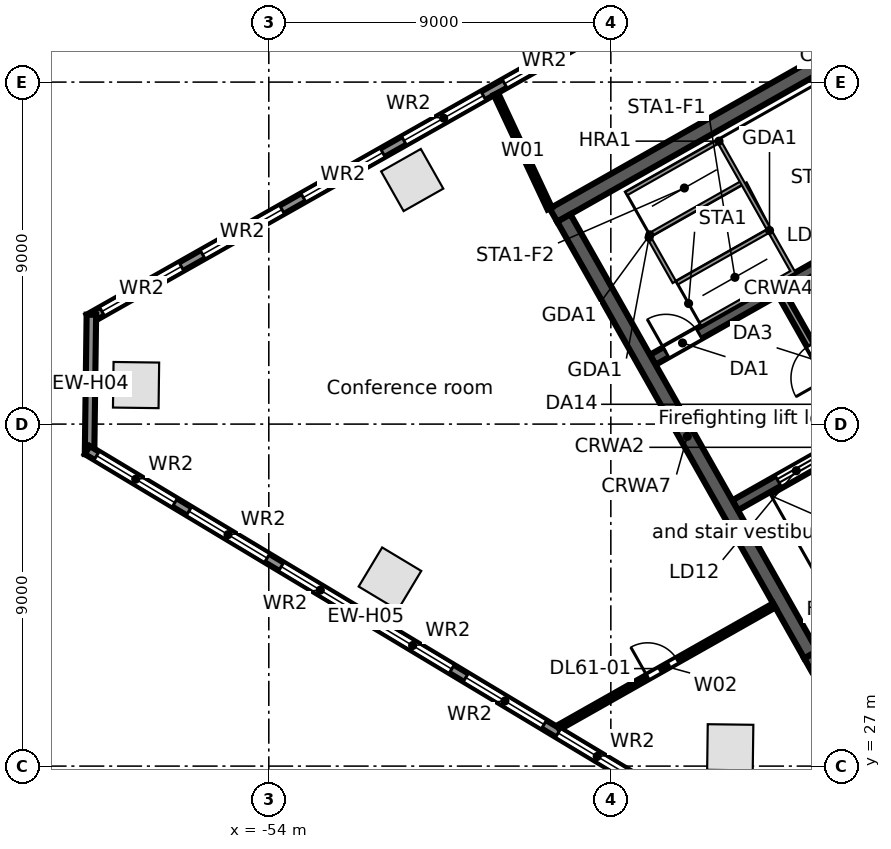
"""IFC4 building model, lengths in metres.
Left out: names, types, materials, properties, quantities, classifications, styles, units other than length and angle.
Written with IfcOpenShell. Run it as: python <this file> out.ifc"""

import sys

from ifc_helpers import new_model, si_unit, direction, frame, frame_2d, origin, origin_2d, place, context, subcontext, project, spatial, rectangle, extrude, element, fill, save


model = new_model("IFC4")
c1 = context("Model", 3, precision=1e-05, world=origin(), true_north=direction((0.0, 1.0)))
c2 = subcontext(c1, "Body", "Model", "MODEL_VIEW")
j1 = project(units=[si_unit("LENGTHUNIT", "METRE"), si_unit("PLANEANGLEUNIT", "RADIAN")], contexts=[c1])
p1 = place(None, origin())
s1 = spatial("IfcSite", under=j1, at=p1, CompositionType="ELEMENT")
p2 = place(p1, origin())
s2 = spatial("IfcBuilding", under=s1, at=p2, CompositionType="ELEMENT")
p3 = place(p2, frame((0.0, 0.0, 274.1)))
s3 = spatial("IfcBuildingStorey", under=s2, at=p3, CompositionType="ELEMENT", Elevation=274.1)
for number, where, z_axis, x_axis in (
    (1, (-50.226, 42.423, 0.0), (0.0, 0.0, 1.0), (-0.87, -0.492, 0.0)),
    (2, (-57.493, 37.027, 0.0), (0.0, 0.0, 1.0), (-0.013, -1.0, 0.0)),
    (3, (-50.812, 31.931, 0.0), (0.0, 0.0, 1.0), (0.857, -0.515, 0.0)),
    (4, (-41.858, 27.495, 0.0), (0.0, 0.0, 1.0), (1.0, -0.013, 0.0)),
):
    element("IfcColumn", number, at=place(p3, frame(where, z_axis=z_axis, x_axis=x_axis)), inside=s3, PredefinedType="COLUMN", context=c2, shape_type="SweptSolid", body=[
        extrude(rectangle(XDim=1.2, YDim=1.2, at=origin_2d()), origin(), (0.0, 0.0, 1.0), 3.8),
    ])
p4 = place(p3, frame((-58.732, 38.771, 0.0), z_axis=(0.0, 0.0, 1.0), x_axis=(0.870355615581, 0.492423702137, 0.0)))
e5 = element("IfcWall", 5, at=p4, inside=s3, PredefinedType="STANDARD", context=c2, shape_type="SweptSolid", body=[
    extrude(rectangle(XDim=64.052, YDim=0.25, at=frame_2d((32.026, 0.0))), origin(), (0.0, 0.0, 1.0), 3.52),
])
p5 = place(p4, frame((61.259, 0.0, 0.8)))
e6 = element("IfcOpeningElement", 6, at=p5, cuts=e5, PredefinedType="OPENING", context=c2, shape_type="SweptSolid", body=[
    extrude(rectangle(XDim=2.4, YDim=2.2, at=frame_2d((1.2, 1.1))), frame((0.0, 0.135, 0.0), z_axis=(0.0, -1.0, 0.0), x_axis=(1.0, 0.0, 0.0)), (0.0, 0.0, 1.0), 0.27),
])
p6 = place(p4, frame((58.216, 0.0, 0.8)))
e7 = element("IfcOpeningElement", 7, at=p6, cuts=e5, PredefinedType="OPENING", context=c2, shape_type="SweptSolid", body=[
    extrude(rectangle(XDim=2.4, YDim=2.2, at=frame_2d((1.2, 1.1))), frame((0.0, 0.135, 0.0), z_axis=(0.0, -1.0, 0.0), x_axis=(1.0, 0.0, 0.0)), (0.0, 0.0, 1.0), 0.27),
])
p7 = place(p4, frame((55.173, 0.0, 0.8)))
e8 = element("IfcOpeningElement", 8, at=p7, cuts=e5, PredefinedType="OPENING", context=c2, shape_type="SweptSolid", body=[
    extrude(rectangle(XDim=2.4, YDim=2.2, at=frame_2d((1.2, 1.1))), frame((0.0, 0.135, 0.0), z_axis=(0.0, -1.0, 0.0), x_axis=(1.0, 0.0, 0.0)), (0.0, 0.0, 1.0), 0.27),
])
p8 = place(p4, frame((52.129, 0.0, 0.8)))
e9 = element("IfcOpeningElement", 9, at=p8, cuts=e5, PredefinedType="OPENING", context=c2, shape_type="SweptSolid", body=[
    extrude(rectangle(XDim=2.4, YDim=2.2, at=frame_2d((1.2, 1.1))), frame((0.0, 0.135, 0.0), z_axis=(0.0, -1.0, 0.0), x_axis=(1.0, 0.0, 0.0)), (0.0, 0.0, 1.0), 0.27),
])
p9 = place(p4, frame((49.086, 0.0, 0.8)))
e10 = element("IfcOpeningElement", 10, at=p9, cuts=e5, PredefinedType="OPENING", context=c2, shape_type="SweptSolid", body=[
    extrude(rectangle(XDim=2.4, YDim=2.2, at=frame_2d((1.2, 1.1))), frame((0.0, 0.135, 0.0), z_axis=(0.0, -1.0, 0.0), x_axis=(1.0, 0.0, 0.0)), (0.0, 0.0, 1.0), 0.27),
])
p10 = place(p4, frame((46.043, 0.0, 0.8)))
e11 = element("IfcOpeningElement", 11, at=p10, cuts=e5, PredefinedType="OPENING", context=c2, shape_type="SweptSolid", body=[
    extrude(rectangle(XDim=2.4, YDim=2.2, at=frame_2d((1.2, 1.1))), frame((0.0, 0.135, 0.0), z_axis=(0.0, -1.0, 0.0), x_axis=(1.0, 0.0, 0.0)), (0.0, 0.0, 1.0), 0.27),
])
p11 = place(p4, frame((43.0, 0.0, 0.8)))
e12 = element("IfcOpeningElement", 12, at=p11, cuts=e5, PredefinedType="OPENING", context=c2, shape_type="SweptSolid", body=[
    extrude(rectangle(XDim=2.4, YDim=2.2, at=frame_2d((1.2, 1.1))), frame((0.0, 0.135, 0.0), z_axis=(0.0, -1.0, 0.0), x_axis=(1.0, 0.0, 0.0)), (0.0, 0.0, 1.0), 0.27),
])
p12 = place(p4, frame((39.956, 0.0, 0.8)))
e13 = element("IfcOpeningElement", 13, at=p12, cuts=e5, PredefinedType="OPENING", context=c2, shape_type="SweptSolid", body=[
    extrude(rectangle(XDim=2.4, YDim=2.2, at=frame_2d((1.2, 1.1))), frame((0.0, 0.135, 0.0), z_axis=(0.0, -1.0, 0.0), x_axis=(1.0, 0.0, 0.0)), (0.0, 0.0, 1.0), 0.27),
])
p13 = place(p4, frame((36.913, 0.0, 0.8)))
e14 = element("IfcOpeningElement", 14, at=p13, cuts=e5, PredefinedType="OPENING", context=c2, shape_type="SweptSolid", body=[
    extrude(rectangle(XDim=2.4, YDim=2.2, at=frame_2d((1.2, 1.1))), frame((0.0, 0.135, 0.0), z_axis=(0.0, -1.0, 0.0), x_axis=(1.0, 0.0, 0.0)), (0.0, 0.0, 1.0), 0.27),
])
p14 = place(p4, frame((33.87, 0.0, 0.8)))
e15 = element("IfcOpeningElement", 15, at=p14, cuts=e5, PredefinedType="OPENING", context=c2, shape_type="SweptSolid", body=[
    extrude(rectangle(XDim=2.4, YDim=2.2, at=frame_2d((1.2, 1.1))), frame((0.0, 0.135, 0.0), z_axis=(0.0, -1.0, 0.0), x_axis=(1.0, 0.0, 0.0)), (0.0, 0.0, 1.0), 0.27),
])
p15 = place(p4, frame((30.826, 0.0, 0.8)))
e16 = element("IfcOpeningElement", 16, at=p15, cuts=e5, PredefinedType="OPENING", context=c2, shape_type="SweptSolid", body=[
    extrude(rectangle(XDim=2.4, YDim=2.2, at=frame_2d((1.2, 1.1))), frame((0.0, 0.135, 0.0), z_axis=(0.0, -1.0, 0.0), x_axis=(1.0, 0.0, 0.0)), (0.0, 0.0, 1.0), 0.27),
])
p16 = place(p4, frame((27.783, 0.0, 0.8)))
e17 = element("IfcOpeningElement", 17, at=p16, cuts=e5, PredefinedType="OPENING", context=c2, shape_type="SweptSolid", body=[
    extrude(rectangle(XDim=2.4, YDim=2.2, at=frame_2d((1.2, 1.1))), frame((0.0, 0.135, 0.0), z_axis=(0.0, -1.0, 0.0), x_axis=(1.0, 0.0, 0.0)), (0.0, 0.0, 1.0), 0.27),
])
p17 = place(p4, frame((24.74, 0.0, 0.8)))
e18 = element("IfcOpeningElement", 18, at=p17, cuts=e5, PredefinedType="OPENING", context=c2, shape_type="SweptSolid", body=[
    extrude(rectangle(XDim=2.4, YDim=2.2, at=frame_2d((1.2, 1.1))), frame((0.0, 0.135, 0.0), z_axis=(0.0, -1.0, 0.0), x_axis=(1.0, 0.0, 0.0)), (0.0, 0.0, 1.0), 0.27),
])
p18 = place(p4, frame((21.696, 0.0, 0.8)))
e19 = element("IfcOpeningElement", 19, at=p18, cuts=e5, PredefinedType="OPENING", context=c2, shape_type="SweptSolid", body=[
    extrude(rectangle(XDim=2.4, YDim=2.2, at=frame_2d((1.2, 1.1))), frame((0.0, 0.135, 0.0), z_axis=(0.0, -1.0, 0.0), x_axis=(1.0, 0.0, 0.0)), (0.0, 0.0, 1.0), 0.27),
])
p19 = place(p4, frame((18.653, 0.0, 0.8)))
e20 = element("IfcOpeningElement", 20, at=p19, cuts=e5, PredefinedType="OPENING", context=c2, shape_type="SweptSolid", body=[
    extrude(rectangle(XDim=2.4, YDim=2.2, at=frame_2d((1.2, 1.1))), frame((0.0, 0.135, 0.0), z_axis=(0.0, -1.0, 0.0), x_axis=(1.0, 0.0, 0.0)), (0.0, 0.0, 1.0), 0.27),
])
p20 = place(p4, frame((15.61, 0.0, 0.8)))
e21 = element("IfcOpeningElement", 21, at=p20, cuts=e5, PredefinedType="OPENING", context=c2, shape_type="SweptSolid", body=[
    extrude(rectangle(XDim=2.4, YDim=2.2, at=frame_2d((1.2, 1.1))), frame((0.0, 0.135, 0.0), z_axis=(0.0, -1.0, 0.0), x_axis=(1.0, 0.0, 0.0)), (0.0, 0.0, 1.0), 0.27),
])
p21 = place(p4, frame((12.567, 0.0, 0.8)))
e22 = element("IfcOpeningElement", 22, at=p21, cuts=e5, PredefinedType="OPENING", context=c2, shape_type="SweptSolid", body=[
    extrude(rectangle(XDim=2.4, YDim=2.2, at=frame_2d((1.2, 1.1))), frame((0.0, 0.135, 0.0), z_axis=(0.0, -1.0, 0.0), x_axis=(1.0, 0.0, 0.0)), (0.0, 0.0, 1.0), 0.27),
])
p22 = place(p4, frame((9.523, 0.0, 0.8)))
e23 = element("IfcOpeningElement", 23, at=p22, cuts=e5, PredefinedType="OPENING", context=c2, shape_type="SweptSolid", body=[
    extrude(rectangle(XDim=2.4, YDim=2.2, at=frame_2d((1.2, 1.1))), frame((0.0, 0.135, 0.0), z_axis=(0.0, -1.0, 0.0), x_axis=(1.0, 0.0, 0.0)), (0.0, 0.0, 1.0), 0.27),
])
p23 = place(p4, frame((6.48, 0.0, 0.8)))
e24 = element("IfcOpeningElement", 24, at=p23, cuts=e5, PredefinedType="OPENING", context=c2, shape_type="SweptSolid", body=[
    extrude(rectangle(XDim=2.4, YDim=2.2, at=frame_2d((1.2, 1.1))), frame((0.0, 0.135, 0.0), z_axis=(0.0, -1.0, 0.0), x_axis=(1.0, 0.0, 0.0)), (0.0, 0.0, 1.0), 0.27),
])
p24 = place(p4, frame((3.437, 0.0, 0.8)))
e25 = element("IfcOpeningElement", 25, at=p24, cuts=e5, PredefinedType="OPENING", context=c2, shape_type="SweptSolid", body=[
    extrude(rectangle(XDim=2.4, YDim=2.2, at=frame_2d((1.2, 1.1))), frame((0.0, 0.135, 0.0), z_axis=(0.0, -1.0, 0.0), x_axis=(1.0, 0.0, 0.0)), (0.0, 0.0, 1.0), 0.27),
])
p25 = place(p4, frame((0.393, 0.0, 0.8)))
e26 = element("IfcOpeningElement", 26, at=p25, cuts=e5, PredefinedType="OPENING", context=c2, shape_type="SweptSolid", body=[
    extrude(rectangle(XDim=2.4, YDim=2.2, at=frame_2d((1.2, 1.1))), frame((0.0, 0.135, 0.0), z_axis=(0.0, -1.0, 0.0), x_axis=(1.0, 0.0, 0.0)), (0.0, 0.0, 1.0), 0.27),
])
p26 = place(p3, frame((-58.717, 35.208, 0.0), z_axis=(0.0, 0.0, 1.0), x_axis=(0.01310512158, 0.999914124207, 0.0)))
e27 = element("IfcWall", 27, at=p26, inside=s3, PredefinedType="STANDARD", context=c2, shape_type="SweptSolid", body=[
    extrude(rectangle(XDim=3.67, YDim=0.25, at=frame_2d((1.835, 0.0))), origin(), (0.0, 0.0, 1.0), 3.52),
])
p27 = place(p3, frame((-44.115, 26.507, 0.0), z_axis=(0.0, 0.0, 1.0), x_axis=(-0.857166583633, 0.515039268311, 0.0)))
e28 = element("IfcWall", 28, at=p27, inside=s3, PredefinedType="STANDARD", context=c2, shape_type="SweptSolid", body=[
    extrude(rectangle(XDim=17.106, YDim=0.25, at=frame_2d((8.553, 0.0))), origin(), (0.0, 0.0, 1.0), 3.52),
])
p28 = place(p27, frame((14.417, 0.0, 0.8)))
e29 = element("IfcOpeningElement", 29, at=p28, cuts=e28, PredefinedType="OPENING", context=c2, shape_type="SweptSolid", body=[
    extrude(rectangle(XDim=2.4, YDim=2.2, at=frame_2d((1.2, 1.1))), frame((0.0, 0.135, 0.0), z_axis=(0.0, -1.0, 0.0), x_axis=(1.0, 0.0, 0.0)), (0.0, 0.0, 1.0), 0.27),
])
p29 = place(p27, frame((11.584, 0.0, 0.8)))
e30 = element("IfcOpeningElement", 30, at=p29, cuts=e28, PredefinedType="OPENING", context=c2, shape_type="SweptSolid", body=[
    extrude(rectangle(XDim=2.4, YDim=2.2, at=frame_2d((1.2, 1.1))), frame((0.0, 0.135, 0.0), z_axis=(0.0, -1.0, 0.0), x_axis=(1.0, 0.0, 0.0)), (0.0, 0.0, 1.0), 0.27),
])
p30 = place(p27, frame((8.75, 0.0, 0.8)))
e31 = element("IfcOpeningElement", 31, at=p30, cuts=e28, PredefinedType="OPENING", context=c2, shape_type="SweptSolid", body=[
    extrude(rectangle(XDim=2.4, YDim=2.2, at=frame_2d((1.2, 1.1))), frame((0.0, 0.135, 0.0), z_axis=(0.0, -1.0, 0.0), x_axis=(1.0, 0.0, 0.0)), (0.0, 0.0, 1.0), 0.27),
])
p31 = place(p27, frame((5.917, 0.0, 0.8)))
e32 = element("IfcOpeningElement", 32, at=p31, cuts=e28, PredefinedType="OPENING", context=c2, shape_type="SweptSolid", body=[
    extrude(rectangle(XDim=2.4, YDim=2.2, at=frame_2d((1.2, 1.1))), frame((0.0, 0.135, 0.0), z_axis=(0.0, -1.0, 0.0), x_axis=(1.0, 0.0, 0.0)), (0.0, 0.0, 1.0), 0.27),
])
p32 = place(p27, frame((3.084, 0.0, 0.8)))
e33 = element("IfcOpeningElement", 33, at=p32, cuts=e28, PredefinedType="OPENING", context=c2, shape_type="SweptSolid", body=[
    extrude(rectangle(XDim=2.4, YDim=2.2, at=frame_2d((1.2, 1.1))), frame((0.0, 0.135, 0.0), z_axis=(0.0, -1.0, 0.0), x_axis=(1.0, 0.0, 0.0)), (0.0, 0.0, 1.0), 0.27),
])
p33 = place(p27, frame((0.25, 0.0, 0.8)))
e34 = element("IfcOpeningElement", 34, at=p33, cuts=e28, PredefinedType="OPENING", context=c2, shape_type="SweptSolid", body=[
    extrude(rectangle(XDim=2.4, YDim=2.2, at=frame_2d((1.2, 1.1))), frame((0.0, 0.135, 0.0), z_axis=(0.0, -1.0, 0.0), x_axis=(1.0, 0.0, 0.0)), (0.0, 0.0, 1.0), 0.27),
])
p34 = place(p3, frame((-39.813, 29.662, 0.0), z_axis=(0.0, 0.0, 1.0), x_axis=(0.870350116061, 0.492433422375, 0.0)))
e35 = element("IfcWall", 35, at=p34, inside=s3, PredefinedType="SOLIDWALL", context=c2, shape_type="SweptSolid", body=[
    extrude(rectangle(XDim=17.0, YDim=0.4, at=frame_2d((8.5, 0.0))), origin(), (0.0, 0.0, 1.0), 3.52),
])
p35 = place(p34, frame((7.2, 0.0, 0.0)))
e36 = element("IfcOpeningElement", 36, at=p35, cuts=e35, PredefinedType="OPENING", context=c2, shape_type="SweptSolid", body=[
    extrude(rectangle(XDim=1.2, YDim=2.1, at=frame_2d((0.6, 1.05))), frame((0.0, 0.21, 0.0), z_axis=(0.0, -1.0, 0.0), x_axis=(1.0, 0.0, 0.0)), (0.0, 0.0, 1.0), 0.42),
])
p36 = place(p3, frame((-41.73, 33.863, 0.0), z_axis=(0.0, 0.0, 1.0), x_axis=(0.870350800578, 0.492432212525, 0.0)))
e37 = element("IfcWall", 37, at=p36, inside=s3, PredefinedType="SOLIDWALL", context=c2, shape_type="SweptSolid", body=[
    extrude(rectangle(XDim=6.2, YDim=0.3, at=frame_2d((3.1, 0.0))), origin(), (0.0, 0.0, 1.0), 3.52),
])
p37 = place(p36, frame((1.3, 0.0, 0.0)))
e38 = element("IfcOpeningElement", 38, at=p37, cuts=e37, PredefinedType="OPENING", context=c2, shape_type="SweptSolid", body=[
    extrude(rectangle(XDim=1.1, YDim=2.1, at=frame_2d((0.55, 1.05))), frame((0.0, 0.16, 0.0), z_axis=(0.0, -1.0, 0.0), x_axis=(1.0, 0.0, 0.0)), (0.0, 0.0, 1.0), 0.32),
])
p38 = place(p36, frame((4.95, 0.0, 0.0)))
e39 = element("IfcOpeningElement", 39, at=p38, cuts=e37, PredefinedType="OPENING", context=c2, shape_type="SweptSolid", body=[
    extrude(rectangle(XDim=0.9, YDim=2.1, at=frame_2d((0.45, 1.05))), frame((0.0, 0.16, 0.0), z_axis=(0.0, -1.0, 0.0), x_axis=(1.0, 0.0, 0.0)), (0.0, 0.0, 1.0), 0.32),
])
p39 = place(p3, frame((-43.897, 37.692, 0.0), z_axis=(0.0, 0.0, 1.0), x_axis=(0.870356351998, 0.492422400523, 0.0)))
e40 = element("IfcWall", 40, at=p39, inside=s3, PredefinedType="SOLIDWALL", context=c2, shape_type="SweptSolid", body=[
    extrude(rectangle(XDim=7.6, YDim=0.3, at=frame_2d((3.8, 0.0))), origin(), (0.0, 0.0, 1.0), 3.52),
])
p40 = place(p39, frame((0.4, 0.0, 0.0)))
e41 = element("IfcOpeningElement", 41, at=p40, cuts=e40, PredefinedType="OPENING", context=c2, shape_type="SweptSolid", body=[
    extrude(rectangle(XDim=1.0, YDim=2.1, at=frame_2d((0.5, 1.05))), frame((0.0, 0.16, 0.0), z_axis=(0.0, -1.0, 0.0), x_axis=(1.0, 0.0, 0.0)), (0.0, 0.0, 1.0), 0.32),
])
p41 = place(p3, frame((-46.51, 41.499, 0.0), z_axis=(0.0, 0.0, 1.0), x_axis=(0.870356271124, 0.492422543467, 0.0)))
e42 = element("IfcWall", 42, at=p41, inside=s3, PredefinedType="SOLIDWALL", context=c2, shape_type="SweptSolid", body=[
    extrude(rectangle(XDim=17.0, YDim=0.4, at=frame_2d((8.5, 0.0))), origin(), (0.0, 0.0, 1.0), 3.52),
])
p42 = place(p3, frame((-46.238, 41.423, 0.0), z_axis=(0.0, 0.0, 1.0), x_axis=(0.492421663121, -0.870356769198, 0.0)))
e43 = element("IfcWall", 43, at=p42, inside=s3, PredefinedType="SOLIDWALL", context=c2, shape_type="SweptSolid", body=[
    extrude(rectangle(XDim=13.2, YDim=0.4, at=frame_2d((6.6, 0.0))), origin(), (0.0, 0.0, 1.0), 3.52),
])
p43 = place(p3, frame((-40.516, 39.433, 0.0), z_axis=(0.0, 0.0, 1.0), x_axis=(0.492453559952, -0.87033872216, 0.0)))
e44 = element("IfcWall", 44, at=p43, inside=s3, PredefinedType="PARTITIONING", context=c2, shape_type="SweptSolid", body=[
    extrude(rectangle(XDim=4.1, YDim=0.2, at=frame_2d((2.05, 0.0))), origin(), (0.0, 0.0, 1.0), 3.52),
])
p44 = place(p43, frame((1.55, 0.0, 0.0)))
e45 = element("IfcOpeningElement", 45, at=p44, cuts=e44, PredefinedType="OPENING", context=c2, shape_type="SweptSolid", body=[
    extrude(rectangle(XDim=1.0, YDim=2.1, at=frame_2d((0.5, 1.05))), frame((0.0, 0.11, 0.0), z_axis=(0.0, -1.0, 0.0), x_axis=(1.0, 0.0, 0.0)), (0.0, 0.0, 1.0), 0.22),
])
p45 = place(p3, frame((-48.022, 44.687, 0.0), z_axis=(0.0, 0.0, 1.0), x_axis=(0.424510917438, -0.905422818895, 0.0)))
e46 = element("IfcWall", 46, at=p45, inside=s3, PredefinedType="PARTITIONING", context=c2, shape_type="SweptSolid", body=[
    extrude(rectangle(XDim=3.329, YDim=0.125, at=frame_2d((1.665, 0.0))), origin(), (0.0, 0.0, 1.0), 2.888),
])
p46 = place(p3, frame((-46.381, 28.015, 0.0), z_axis=(0.0, 0.0, 1.0), x_axis=(0.870364232693, 0.492408471139, 0.0)))
e47 = element("IfcWall", 47, at=p46, inside=s3, PredefinedType="PARTITIONING", context=c2, shape_type="SweptSolid", body=[
    extrude(rectangle(XDim=6.527, YDim=0.125, at=frame_2d((3.264, 0.0))), origin(), (0.0, 0.0, 1.0), 2.8),
])
p47 = place(p46, frame((2.7, 0.0, 0.0)))
e48 = element("IfcOpeningElement", 48, at=p47, cuts=e47, PredefinedType="OPENING", context=c2, shape_type="SweptSolid", body=[
    extrude(rectangle(XDim=0.9, YDim=2.1, at=frame_2d((0.45, 1.05))), frame((0.0, 0.073, 0.0), z_axis=(0.0, -1.0, 0.0), x_axis=(1.0, 0.0, 0.0)), (0.0, 0.0, 1.0), 0.145),
])
p48 = place(p21, origin())
e49 = element("IfcWindow", 49, at=p48, inside=s3, PartitioningType="SINGLE_PANEL", PredefinedType="WINDOW", context=c2, shape_type="SweptSolid", body=[
    extrude(rectangle(XDim=2.4, YDim=2.2, at=frame_2d((1.2, 1.1))), frame((0.0, 0.03, 0.0), z_axis=(0.0, -1.0, 0.0), x_axis=(1.0, 0.0, 0.0)), (0.0, 0.0, 1.0), 0.06),
])
fill(e22, e49)
p49 = place(p22, origin())
e50 = element("IfcWindow", 50, at=p49, inside=s3, PartitioningType="SINGLE_PANEL", PredefinedType="WINDOW", context=c2, shape_type="SweptSolid", body=[
    extrude(rectangle(XDim=2.4, YDim=2.2, at=frame_2d((1.2, 1.1))), frame((0.0, 0.03, 0.0), z_axis=(0.0, -1.0, 0.0), x_axis=(1.0, 0.0, 0.0)), (0.0, 0.0, 1.0), 0.06),
])
fill(e23, e50)
p50 = place(p23, origin())
e51 = element("IfcWindow", 51, at=p50, inside=s3, PartitioningType="SINGLE_PANEL", PredefinedType="WINDOW", context=c2, shape_type="SweptSolid", body=[
    extrude(rectangle(XDim=2.4, YDim=2.2, at=frame_2d((1.2, 1.1))), frame((0.0, 0.03, 0.0), z_axis=(0.0, -1.0, 0.0), x_axis=(1.0, 0.0, 0.0)), (0.0, 0.0, 1.0), 0.06),
])
fill(e24, e51)
p51 = place(p24, origin())
e52 = element("IfcWindow", 52, at=p51, inside=s3, PartitioningType="SINGLE_PANEL", PredefinedType="WINDOW", context=c2, shape_type="SweptSolid", body=[
    extrude(rectangle(XDim=2.4, YDim=2.2, at=frame_2d((1.2, 1.1))), frame((0.0, 0.03, 0.0), z_axis=(0.0, -1.0, 0.0), x_axis=(1.0, 0.0, 0.0)), (0.0, 0.0, 1.0), 0.06),
])
fill(e25, e52)
p52 = place(p25, origin())
e53 = element("IfcWindow", 53, at=p52, inside=s3, PartitioningType="SINGLE_PANEL", PredefinedType="WINDOW", context=c2, shape_type="SweptSolid", body=[
    extrude(rectangle(XDim=2.4, YDim=2.2, at=frame_2d((1.2, 1.1))), frame((0.0, 0.03, 0.0), z_axis=(0.0, -1.0, 0.0), x_axis=(1.0, 0.0, 0.0)), (0.0, 0.0, 1.0), 0.06),
])
fill(e26, e53)
p53 = place(p28, origin())
e54 = element("IfcWindow", 54, at=p53, inside=s3, PartitioningType="SINGLE_PANEL", PredefinedType="WINDOW", context=c2, shape_type="SweptSolid", body=[
    extrude(rectangle(XDim=2.4, YDim=2.2, at=frame_2d((1.2, 1.1))), frame((0.0, 0.03, 0.0), z_axis=(0.0, -1.0, 0.0), x_axis=(1.0, 0.0, 0.0)), (0.0, 0.0, 1.0), 0.06),
])
fill(e29, e54)
p54 = place(p29, origin())
e55 = element("IfcWindow", 55, at=p54, inside=s3, PartitioningType="SINGLE_PANEL", PredefinedType="WINDOW", context=c2, shape_type="SweptSolid", body=[
    extrude(rectangle(XDim=2.4, YDim=2.2, at=frame_2d((1.2, 1.1))), frame((0.0, 0.03, 0.0), z_axis=(0.0, -1.0, 0.0), x_axis=(1.0, 0.0, 0.0)), (0.0, 0.0, 1.0), 0.06),
])
fill(e30, e55)
p55 = place(p30, origin())
e56 = element("IfcWindow", 56, at=p55, inside=s3, PartitioningType="SINGLE_PANEL", PredefinedType="WINDOW", context=c2, shape_type="SweptSolid", body=[
    extrude(rectangle(XDim=2.4, YDim=2.2, at=frame_2d((1.2, 1.1))), frame((0.0, 0.03, 0.0), z_axis=(0.0, -1.0, 0.0), x_axis=(1.0, 0.0, 0.0)), (0.0, 0.0, 1.0), 0.06),
])
fill(e31, e56)
p56 = place(p31, origin())
e57 = element("IfcWindow", 57, at=p56, inside=s3, PartitioningType="SINGLE_PANEL", PredefinedType="WINDOW", context=c2, shape_type="SweptSolid", body=[
    extrude(rectangle(XDim=2.4, YDim=2.2, at=frame_2d((1.2, 1.1))), frame((0.0, 0.03, 0.0), z_axis=(0.0, -1.0, 0.0), x_axis=(1.0, 0.0, 0.0)), (0.0, 0.0, 1.0), 0.06),
])
fill(e32, e57)
p57 = place(p32, origin())
e58 = element("IfcWindow", 58, at=p57, inside=s3, PartitioningType="SINGLE_PANEL", PredefinedType="WINDOW", context=c2, shape_type="SweptSolid", body=[
    extrude(rectangle(XDim=2.4, YDim=2.2, at=frame_2d((1.2, 1.1))), frame((0.0, 0.03, 0.0), z_axis=(0.0, -1.0, 0.0), x_axis=(1.0, 0.0, 0.0)), (0.0, 0.0, 1.0), 0.06),
])
fill(e33, e58)
p58 = place(p33, origin())
e59 = element("IfcWindow", 59, at=p58, inside=s3, PartitioningType="SINGLE_PANEL", PredefinedType="WINDOW", context=c2, shape_type="SweptSolid", body=[
    extrude(rectangle(XDim=2.4, YDim=2.2, at=frame_2d((1.2, 1.1))), frame((0.0, 0.03, 0.0), z_axis=(0.0, -1.0, 0.0), x_axis=(1.0, 0.0, 0.0)), (0.0, 0.0, 1.0), 0.06),
])
fill(e34, e59)
p59 = place(p37, origin())
e60 = element("IfcDoor", 60, at=p59, inside=s3, OperationType="DOUBLE_DOOR_SLIDING", PredefinedType="DOOR", context=c2, shape_type="SweptSolid", body=[
    extrude(rectangle(XDim=1.1, YDim=2.1, at=frame_2d((0.55, 1.05))), frame((0.0, 0.025, 0.0), z_axis=(0.0, -1.0, 0.0), x_axis=(1.0, 0.0, 0.0)), (0.0, 0.0, 1.0), 0.05),
])
fill(e38, e60)
p60 = place(p40, origin())
e61 = element("IfcDoor", 61, at=p60, inside=s3, OperationType="SINGLE_SWING_LEFT", PredefinedType="DOOR", context=c2, shape_type="SweptSolid", body=[
    extrude(rectangle(XDim=1.0, YDim=2.1, at=frame_2d((0.5, 1.05))), frame((0.0, 0.025, 0.0), z_axis=(0.0, -1.0, 0.0), x_axis=(1.0, 0.0, 0.0)), (0.0, 0.0, 1.0), 0.05),
])
fill(e41, e61)
p61 = place(p44, frame((1.0, 0.0, 0.0), z_axis=(0.0, 0.0, 1.0), x_axis=(-1.0, 0.0, 0.0)))
e62 = element("IfcDoor", 62, at=p61, inside=s3, OperationType="SINGLE_SWING_LEFT", PredefinedType="DOOR", context=c2, shape_type="SweptSolid", body=[
    extrude(rectangle(XDim=1.0, YDim=2.1, at=frame_2d((0.5, 1.05))), frame((0.0, 0.025, 0.0), z_axis=(0.0, -1.0, 0.0), x_axis=(1.0, 0.0, 0.0)), (0.0, 0.0, 1.0), 0.05),
])
fill(e45, e62)
p62 = place(p47, origin())
e63 = element("IfcDoor", 63, at=p62, inside=s3, OperationType="SINGLE_SWING_LEFT", PredefinedType="DOOR", context=c2, shape_type="SweptSolid", body=[
    extrude(rectangle(XDim=0.9, YDim=2.1, at=frame_2d((0.45, 1.05))), frame((0.0, 0.025, 0.0), z_axis=(0.0, -1.0, 0.0), x_axis=(1.0, 0.0, 0.0)), (0.0, 0.0, 1.0), 0.05),
])
fill(e48, e63)
save(model, sys.argv[1])
